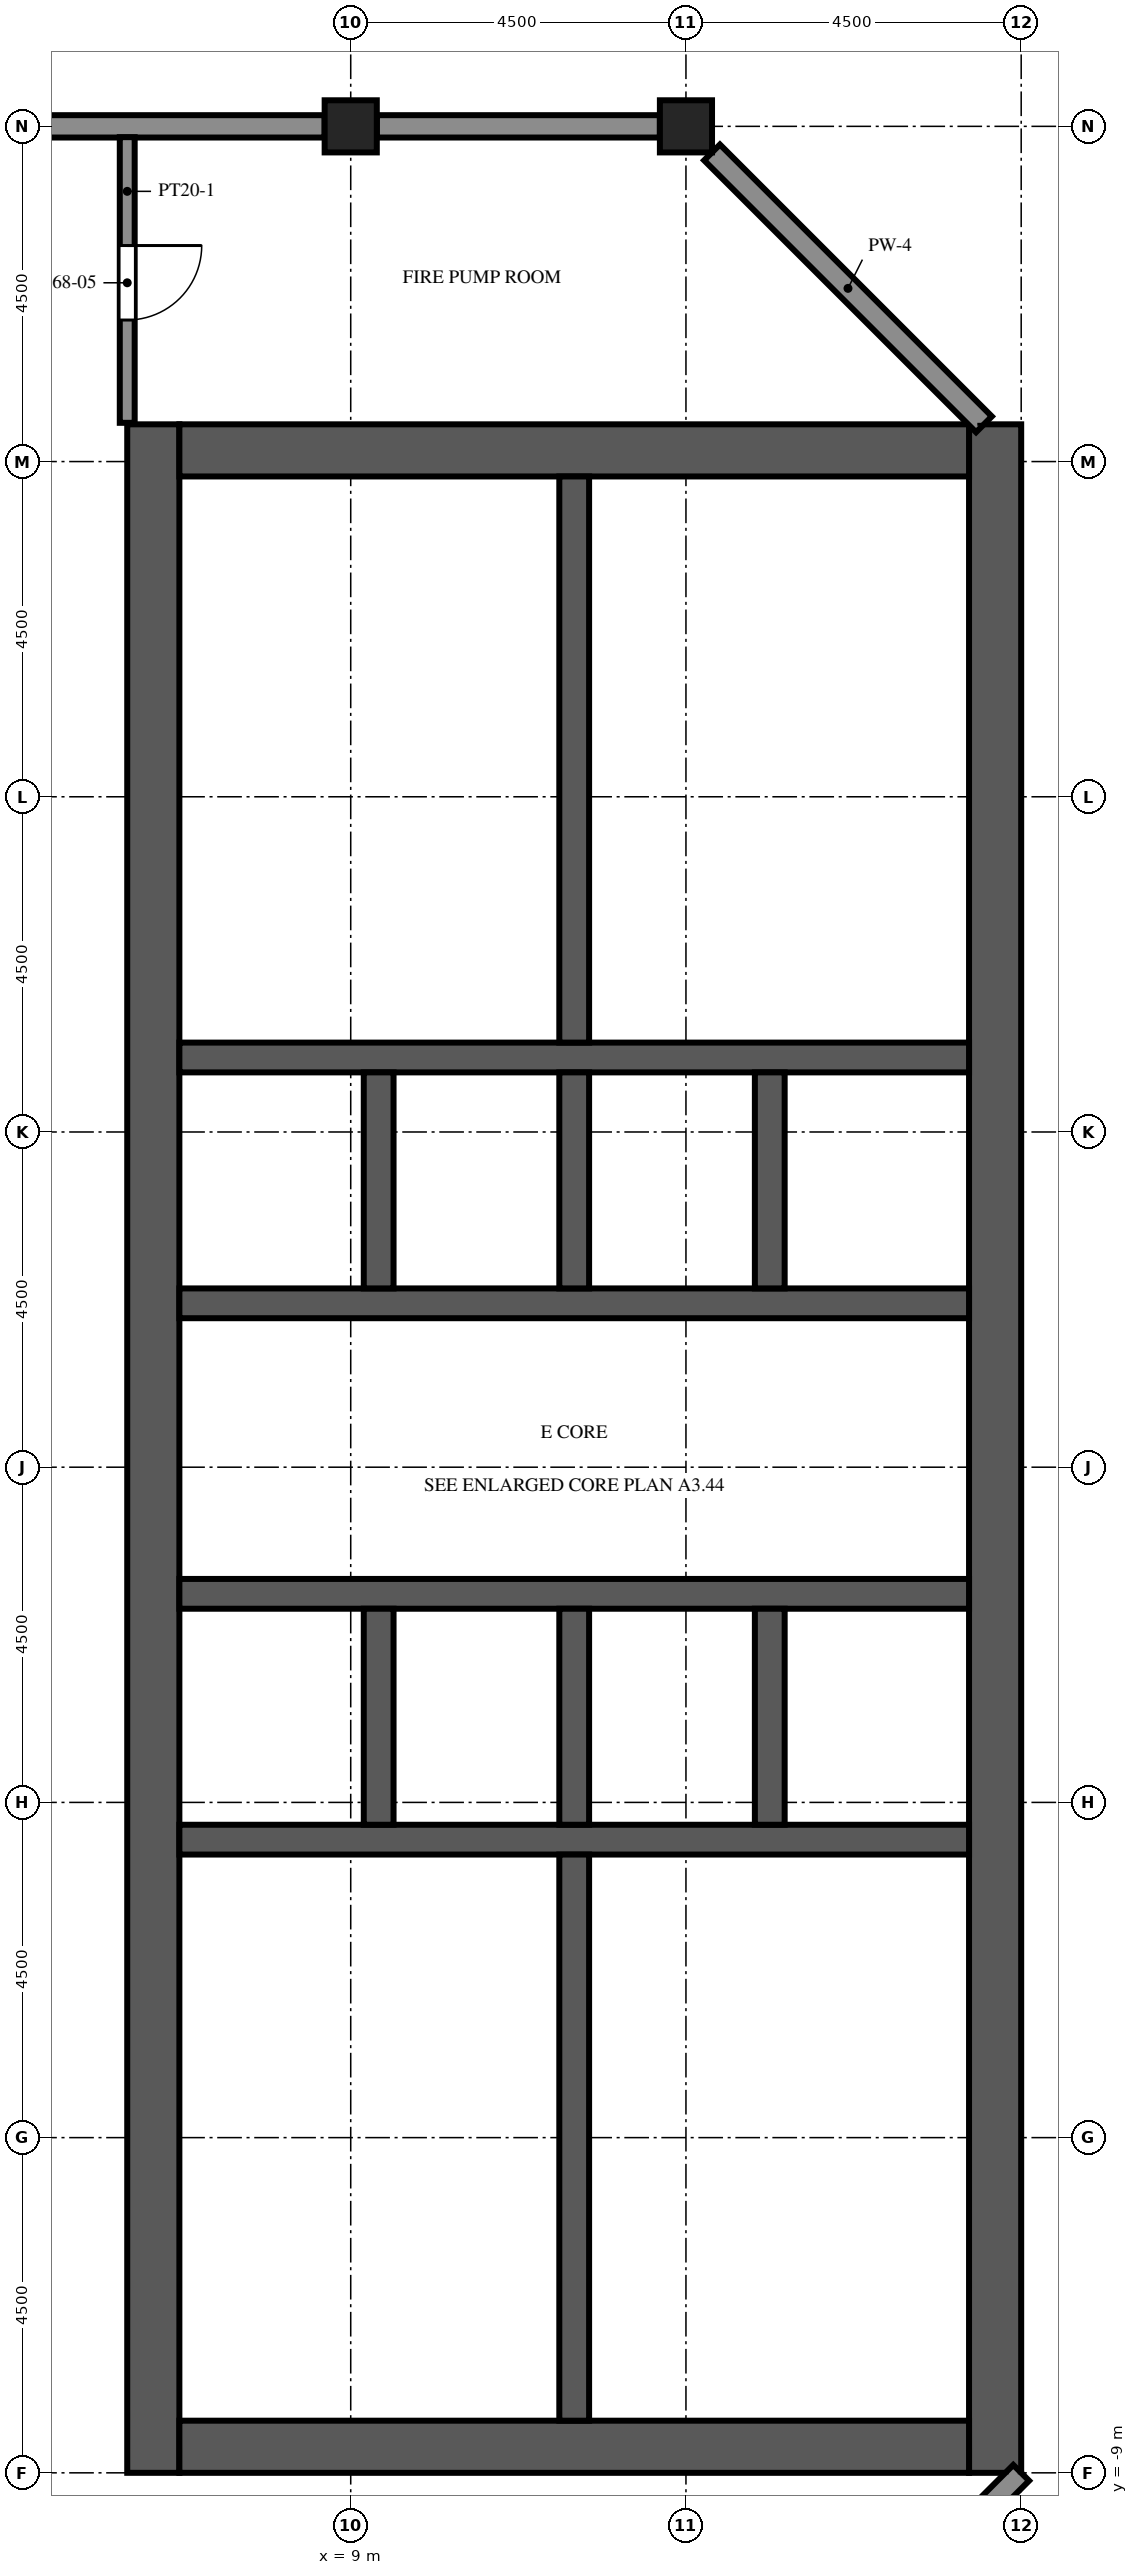
"""IFC4 building model, lengths in metres.
Left out: names, types, materials, properties, quantities, classifications, styles, units other than length and angle.
Written with IfcOpenShell. Run it as: python <this file> out.ifc"""

import sys

from ifc_helpers import new_model, si_unit, direction, frame, frame_2d, origin, origin_2d, place, context, subcontext, project, spatial, rectangle, extrude, element, fill, save


model = new_model("IFC4")
c1 = context("Model", 3, precision=1e-05, world=origin(), true_north=direction((0.0, 1.0)))
c2 = subcontext(c1, "Body", "Model", "MODEL_VIEW")
j1 = project(units=[si_unit("LENGTHUNIT", "METRE"), si_unit("PLANEANGLEUNIT", "RADIAN")], contexts=[c1])
p1 = place(None, origin())
s1 = spatial("IfcSite", under=j1, at=p1, CompositionType="ELEMENT")
p2 = place(p1, origin())
s2 = spatial("IfcBuilding", under=s1, at=p2, CompositionType="ELEMENT")
p3 = place(p2, frame((0.0, 0.0, 301.0)))
s3 = spatial("IfcBuildingStorey", under=s2, at=p3, CompositionType="ELEMENT", Elevation=301.0)
for number, where, z_axis, x_axis in (
    (1, (9.0, 22.5, -0.6), (0.0, 0.0, 1.0), (1.0, 0.0, 0.0)),
    (2, (13.5, 22.5, -0.6), (0.0, 0.0, 1.0), (1.0, 0.0, 0.0)),
):
    element("IfcColumn", number, at=place(p3, frame(where, z_axis=z_axis, x_axis=x_axis)), inside=s3, PredefinedType="COLUMN", context=c2, shape_type="SweptSolid", body=[
        extrude(rectangle(XDim=0.7, YDim=0.7, at=origin_2d()), origin(), (0.0, 0.0, 1.0), 6.0),
    ])
p4 = place(p3, frame((6.35, -9.0, 0.0), z_axis=(0.0, 0.0, 1.0), x_axis=(0.0, 1.0, 0.0)))
e3 = element("IfcWall", 3, at=p4, inside=s3, PredefinedType="SHEAR", context=c2, shape_type="SweptSolid", body=[
    extrude(rectangle(XDim=27.5, YDim=0.7, at=frame_2d((13.75, 0.0))), origin(), (0.0, 0.0, 1.0), 5.4),
])
p5 = place(p4, frame((12.55, 0.0, 0.0)))
e4 = element("IfcOpeningElement", 4, at=p5, cuts=e3, PredefinedType="OPENING", context=c2, shape_type="SweptSolid", body=[
    extrude(rectangle(XDim=2.4, YDim=2.4, at=frame_2d((1.2, 1.2))), frame((0.0, 0.36, 0.0), z_axis=(0.0, -1.0, 0.0), x_axis=(1.0, 0.0, 0.0)), (0.0, 0.0, 1.0), 0.72),
])
p6 = place(p4, frame((3.9, 0.0, 0.0)))
e5 = element("IfcOpeningElement", 5, at=p6, cuts=e3, PredefinedType="OPENING", context=c2, shape_type="SweptSolid", body=[
    extrude(rectangle(XDim=1.2, YDim=2.1, at=frame_2d((0.6, 1.05))), frame((0.0, 0.36, 0.0), z_axis=(0.0, -1.0, 0.0), x_axis=(1.0, 0.0, 0.0)), (0.0, 0.0, 1.0), 0.72),
])
p7 = place(p4, frame((22.4, 0.0, 0.0)))
e6 = element("IfcOpeningElement", 6, at=p7, cuts=e3, PredefinedType="OPENING", context=c2, shape_type="SweptSolid", body=[
    extrude(rectangle(XDim=1.2, YDim=2.1, at=frame_2d((0.6, 1.05))), frame((0.0, 0.36, 0.0), z_axis=(0.0, -1.0, 0.0), x_axis=(1.0, 0.0, 0.0)), (0.0, 0.0, 1.0), 0.72),
])
p8 = place(p3, frame((17.65, -9.0, 0.0), z_axis=(0.0, 0.0, 1.0), x_axis=(0.0, 1.0, 0.0)))
e7 = element("IfcWall", 7, at=p8, inside=s3, PredefinedType="SHEAR", context=c2, shape_type="SweptSolid", body=[
    extrude(rectangle(XDim=27.5, YDim=0.7, at=frame_2d((13.75, 0.0))), origin(), (0.0, 0.0, 1.0), 5.4),
])
for number, where, z_axis, x_axis in (
    (8, (6.7, -8.65, 0.0), (0.0, 0.0, 1.0), (1.0, 0.0, 0.0)),
    (9, (6.7, 18.15, 0.0), (0.0, 0.0, 1.0), (1.0, 0.0, 0.0)),
):
    element("IfcWall", number, at=place(p3, frame(where, z_axis=z_axis, x_axis=x_axis)), inside=s3, PredefinedType="SHEAR", context=c2, shape_type="SweptSolid", body=[
        extrude(rectangle(XDim=10.6, YDim=0.7, at=frame_2d((5.3, 0.0))), origin(), (0.0, 0.0, 1.0), 5.4),
    ])
p9 = place(p3, frame((6.7, -0.5, 0.0), z_axis=(0.0, 0.0, 1.0), x_axis=(1.0, 0.0, 0.0)))
e10 = element("IfcWall", 10, at=p9, inside=s3, PredefinedType="SHEAR", context=c2, shape_type="SweptSolid", body=[
    extrude(rectangle(XDim=10.6, YDim=0.4, at=frame_2d((5.3, 0.0))), origin(), (0.0, 0.0, 1.0), 5.4),
])
p10 = place(p3, frame((6.7, 2.8, 0.0), z_axis=(0.0, 0.0, 1.0), x_axis=(1.0, 0.0, 0.0)))
e11 = element("IfcWall", 11, at=p10, inside=s3, PredefinedType="SHEAR", context=c2, shape_type="SweptSolid", body=[
    extrude(rectangle(XDim=10.6, YDim=0.4, at=frame_2d((5.3, 0.0))), origin(), (0.0, 0.0, 1.0), 5.4),
])
p11 = place(p10, frame((0.688, 0.0, 0.0)))
e12 = element("IfcOpeningElement", 12, at=p11, cuts=e11, PredefinedType="OPENING", context=c2, shape_type="SweptSolid", body=[
    extrude(rectangle(XDim=1.1, YDim=2.1, at=frame_2d((0.55, 1.05))), frame((0.0, 0.21, 0.0), z_axis=(0.0, -1.0, 0.0), x_axis=(1.0, 0.0, 0.0)), (0.0, 0.0, 1.0), 0.42),
])
p12 = place(p10, frame((3.438, 0.0, 0.0)))
e13 = element("IfcOpeningElement", 13, at=p12, cuts=e11, PredefinedType="OPENING", context=c2, shape_type="SweptSolid", body=[
    extrude(rectangle(XDim=1.1, YDim=2.1, at=frame_2d((0.55, 1.05))), frame((0.0, 0.21, 0.0), z_axis=(0.0, -1.0, 0.0), x_axis=(1.0, 0.0, 0.0)), (0.0, 0.0, 1.0), 0.42),
])
p13 = place(p10, frame((6.113, 0.0, 0.0)))
e14 = element("IfcOpeningElement", 14, at=p13, cuts=e11, PredefinedType="OPENING", context=c2, shape_type="SweptSolid", body=[
    extrude(rectangle(XDim=1.0, YDim=2.1, at=frame_2d((0.5, 1.05))), frame((0.0, 0.21, 0.0), z_axis=(0.0, -1.0, 0.0), x_axis=(1.0, 0.0, 0.0)), (0.0, 0.0, 1.0), 0.42),
])
p14 = place(p10, frame((8.863, 0.0, 0.0)))
e15 = element("IfcOpeningElement", 15, at=p14, cuts=e11, PredefinedType="OPENING", context=c2, shape_type="SweptSolid", body=[
    extrude(rectangle(XDim=1.0, YDim=2.1, at=frame_2d((0.5, 1.05))), frame((0.0, 0.21, 0.0), z_axis=(0.0, -1.0, 0.0), x_axis=(1.0, 0.0, 0.0)), (0.0, 0.0, 1.0), 0.42),
])
p15 = place(p3, frame((6.7, 6.7, 0.0), z_axis=(0.0, 0.0, 1.0), x_axis=(1.0, 0.0, 0.0)))
e16 = element("IfcWall", 16, at=p15, inside=s3, PredefinedType="SHEAR", context=c2, shape_type="SweptSolid", body=[
    extrude(rectangle(XDim=10.6, YDim=0.4, at=frame_2d((5.3, 0.0))), origin(), (0.0, 0.0, 1.0), 5.4),
])
p16 = place(p15, frame((0.738, 0.0, 0.0)))
e17 = element("IfcOpeningElement", 17, at=p16, cuts=e16, PredefinedType="OPENING", context=c2, shape_type="SweptSolid", body=[
    extrude(rectangle(XDim=1.0, YDim=2.1, at=frame_2d((0.5, 1.05))), frame((0.0, 0.21, 0.0), z_axis=(0.0, -1.0, 0.0), x_axis=(1.0, 0.0, 0.0)), (0.0, 0.0, 1.0), 0.42),
])
p17 = place(p15, frame((3.488, 0.0, 0.0)))
e18 = element("IfcOpeningElement", 18, at=p17, cuts=e16, PredefinedType="OPENING", context=c2, shape_type="SweptSolid", body=[
    extrude(rectangle(XDim=1.0, YDim=2.1, at=frame_2d((0.5, 1.05))), frame((0.0, 0.21, 0.0), z_axis=(0.0, -1.0, 0.0), x_axis=(1.0, 0.0, 0.0)), (0.0, 0.0, 1.0), 0.42),
])
p18 = place(p15, frame((6.113, 0.0, 0.0)))
e19 = element("IfcOpeningElement", 19, at=p18, cuts=e16, PredefinedType="OPENING", context=c2, shape_type="SweptSolid", body=[
    extrude(rectangle(XDim=1.0, YDim=2.1, at=frame_2d((0.5, 1.05))), frame((0.0, 0.21, 0.0), z_axis=(0.0, -1.0, 0.0), x_axis=(1.0, 0.0, 0.0)), (0.0, 0.0, 1.0), 0.42),
])
p19 = place(p15, frame((8.863, 0.0, 0.0)))
e20 = element("IfcOpeningElement", 20, at=p19, cuts=e16, PredefinedType="OPENING", context=c2, shape_type="SweptSolid", body=[
    extrude(rectangle(XDim=1.0, YDim=2.1, at=frame_2d((0.5, 1.05))), frame((0.0, 0.21, 0.0), z_axis=(0.0, -1.0, 0.0), x_axis=(1.0, 0.0, 0.0)), (0.0, 0.0, 1.0), 0.42),
])
p20 = place(p3, frame((6.7, 10.0, 0.0), z_axis=(0.0, 0.0, 1.0), x_axis=(1.0, 0.0, 0.0)))
e21 = element("IfcWall", 21, at=p20, inside=s3, PredefinedType="SHEAR", context=c2, shape_type="SweptSolid", body=[
    extrude(rectangle(XDim=10.6, YDim=0.4, at=frame_2d((5.3, 0.0))), origin(), (0.0, 0.0, 1.0), 5.4),
])
for number, where, z_axis, x_axis in (
    (22, (9.375, -0.3, 0.0), (0.0, 0.0, 1.0), (0.0, 1.0, 0.0)),
    (23, (9.375, 6.9, 0.0), (0.0, 0.0, 1.0), (0.0, 1.0, 0.0)),
    (24, (12.0, -0.3, 0.0), (0.0, 0.0, 1.0), (0.0, 1.0, 0.0)),
    (25, (12.0, 6.9, 0.0), (0.0, 0.0, 1.0), (0.0, 1.0, 0.0)),
    (26, (14.625, -0.3, 0.0), (0.0, 0.0, 1.0), (0.0, 1.0, 0.0)),
    (27, (14.625, 6.9, 0.0), (0.0, 0.0, 1.0), (0.0, 1.0, 0.0)),
):
    element("IfcWall", number, at=place(p3, frame(where, z_axis=z_axis, x_axis=x_axis)), inside=s3, PredefinedType="SHEAR", context=c2, shape_type="SweptSolid", body=[
        extrude(rectangle(XDim=2.9, YDim=0.4, at=frame_2d((1.45, 0.0))), origin(), (0.0, 0.0, 1.0), 5.4),
    ])
p21 = place(p3, frame((12.0, -8.3, 0.0), z_axis=(0.0, 0.0, 1.0), x_axis=(0.0, 1.0, 0.0)))
e28 = element("IfcWall", 28, at=p21, inside=s3, PredefinedType="SHEAR", context=c2, shape_type="SweptSolid", body=[
    extrude(rectangle(XDim=7.6, YDim=0.4, at=frame_2d((3.8, 0.0))), origin(), (0.0, 0.0, 1.0), 5.4),
])
p22 = place(p21, frame((6.125, 0.0, 0.0)))
e29 = element("IfcOpeningElement", 29, at=p22, cuts=e28, PredefinedType="OPENING", context=c2, shape_type="SweptSolid", body=[
    extrude(rectangle(XDim=1.2, YDim=2.1, at=frame_2d((0.6, 1.05))), frame((0.0, 0.21, 0.0), z_axis=(0.0, -1.0, 0.0), x_axis=(1.0, 0.0, 0.0)), (0.0, 0.0, 1.0), 0.42),
])
p23 = place(p3, frame((12.0, 10.2, 0.0), z_axis=(0.0, 0.0, 1.0), x_axis=(0.0, 1.0, 0.0)))
e30 = element("IfcWall", 30, at=p23, inside=s3, PredefinedType="SHEAR", context=c2, shape_type="SweptSolid", body=[
    extrude(rectangle(XDim=7.6, YDim=0.4, at=frame_2d((3.8, 0.0))), origin(), (0.0, 0.0, 1.0), 5.4),
])
p24 = place(p23, frame((0.275, 0.0, 0.0)))
e31 = element("IfcOpeningElement", 31, at=p24, cuts=e30, PredefinedType="OPENING", context=c2, shape_type="SweptSolid", body=[
    extrude(rectangle(XDim=1.2, YDim=2.1, at=frame_2d((0.6, 1.05))), frame((0.0, 0.21, 0.0), z_axis=(0.0, -1.0, 0.0), x_axis=(1.0, 0.0, 0.0)), (0.0, 0.0, 1.0), 0.42),
])
p25 = place(p3, frame((13.85, -13.15, 0.0), z_axis=(0.0, 0.0, 1.0), x_axis=(0.707106781187, 0.707106781187, 0.0)))
e32 = element("IfcWall", 32, at=p25, inside=s3, PredefinedType="SOLIDWALL", context=c2, shape_type="SweptSolid", body=[
    extrude(rectangle(XDim=5.869, YDim=0.3, at=frame_2d((2.935, 0.0))), origin(), (0.0, 0.0, 1.0), 4.1),
])
p26 = place(p3, frame((17.5, 18.5, 0.0), z_axis=(0.0, 0.0, 1.0), x_axis=(-0.707106781187, 0.707106781187, 0.0)))
e33 = element("IfcWall", 33, at=p26, inside=s3, PredefinedType="SOLIDWALL", context=c2, shape_type="SweptSolid", body=[
    extrude(rectangle(XDim=5.162, YDim=0.3, at=frame_2d((2.581, 0.0))), origin(), (0.0, 0.0, 1.0), 4.1),
])
for number, where, z_axis, x_axis in (
    (34, (13.15, 22.5, 0.0), (0.0, 0.0, 1.0), (-1.0, 0.0, 0.0)),
    (35, (8.65, 22.5, 0.0), (0.0, 0.0, 1.0), (-1.0, 0.0, 0.0)),
):
    element("IfcWall", number, at=place(p3, frame(where, z_axis=z_axis, x_axis=x_axis)), inside=s3, PredefinedType="SOLIDWALL", context=c2, shape_type="SweptSolid", body=[
        extrude(rectangle(XDim=3.8, YDim=0.3, at=frame_2d((1.9, 0.0))), origin(), (0.0, 0.0, 1.0), 0.85),
    ])
p27 = place(p3, frame((17.917, 26.8, 0.0), z_axis=(0.0, 0.0, 1.0), x_axis=(0.707106781187, -0.707106781187, 0.0)))
e36 = element("IfcWall", 36, at=p27, inside=s3, PredefinedType="PARAPET", context=c2, shape_type="SweptSolid", body=[
    extrude(rectangle(XDim=6.198, YDim=0.2, at=frame_2d((3.099, 0.0))), origin(), (0.0, 0.0, 1.0), 1.1),
])
p28 = place(p3, frame((6.0, 22.355, 0.0), z_axis=(0.0, 0.0, 1.0), x_axis=(0.0, -1.0, 0.0)))
e37 = element("IfcWall", 37, at=p28, inside=s3, PredefinedType="PARTITIONING", context=c2, shape_type="SweptSolid", body=[
    extrude(rectangle(XDim=3.835, YDim=0.2, at=frame_2d((1.917, 0.0))), origin(), (0.0, 0.0, 1.0), 4.8),
])
p29 = place(p28, frame((1.455, 0.0, 0.0)))
e38 = element("IfcOpeningElement", 38, at=p29, cuts=e37, PredefinedType="OPENING", context=c2, shape_type="SweptSolid", body=[
    extrude(rectangle(XDim=1.0, YDim=2.1, at=frame_2d((0.5, 1.05))), frame((0.0, 0.11, 0.0), z_axis=(0.0, -1.0, 0.0), x_axis=(1.0, 0.0, 0.0)), (0.0, 0.0, 1.0), 0.22),
])
p30 = place(p29, origin())
e39 = element("IfcDoor", 39, at=p30, inside=s3, OperationType="SINGLE_SWING_LEFT", PredefinedType="DOOR", context=c2, shape_type="SweptSolid", body=[
    extrude(rectangle(XDim=1.0, YDim=2.1, at=frame_2d((0.5, 1.05))), frame((0.0, 0.025, 0.0), z_axis=(0.0, -1.0, 0.0), x_axis=(1.0, 0.0, 0.0)), (0.0, 0.0, 1.0), 0.05),
])
fill(e38, e39)
p31 = place(p11, origin())
e40 = element("IfcDoor", 40, at=p31, inside=s3, OperationType="DOUBLE_DOOR_SLIDING", PredefinedType="DOOR", context=c2, shape_type="SweptSolid", body=[
    extrude(rectangle(XDim=1.1, YDim=2.1, at=frame_2d((0.55, 1.05))), frame((0.0, 0.025, 0.0), z_axis=(0.0, -1.0, 0.0), x_axis=(1.0, 0.0, 0.0)), (0.0, 0.0, 1.0), 0.05),
])
fill(e12, e40)
p32 = place(p12, origin())
e41 = element("IfcDoor", 41, at=p32, inside=s3, OperationType="DOUBLE_DOOR_SLIDING", PredefinedType="DOOR", context=c2, shape_type="SweptSolid", body=[
    extrude(rectangle(XDim=1.1, YDim=2.1, at=frame_2d((0.55, 1.05))), frame((0.0, 0.025, 0.0), z_axis=(0.0, -1.0, 0.0), x_axis=(1.0, 0.0, 0.0)), (0.0, 0.0, 1.0), 0.05),
])
fill(e13, e41)
p33 = place(p5, origin())
e42 = element("IfcDoor", 42, at=p33, inside=s3, OperationType="DOUBLE_DOOR_DOUBLE_SWING", PredefinedType="DOOR", context=c2, shape_type="SweptSolid", body=[
    extrude(rectangle(XDim=2.4, YDim=2.4, at=frame_2d((1.2, 1.2))), frame((0.0, 0.025, 0.0), z_axis=(0.0, -1.0, 0.0), x_axis=(1.0, 0.0, 0.0)), (0.0, 0.0, 1.0), 0.05),
])
fill(e4, e42)
p34 = place(p22, origin())
e43 = element("IfcDoor", 43, at=p34, inside=s3, OperationType="SINGLE_SWING_RIGHT", PredefinedType="DOOR", context=c2, shape_type="SweptSolid", body=[
    extrude(rectangle(XDim=1.2, YDim=2.1, at=frame_2d((0.6, 1.05))), frame((0.0, 0.025, 0.0), z_axis=(0.0, -1.0, 0.0), x_axis=(1.0, 0.0, 0.0)), (0.0, 0.0, 1.0), 0.05),
])
fill(e29, e43)
p35 = place(p24, origin())
e44 = element("IfcDoor", 44, at=p35, inside=s3, OperationType="SINGLE_SWING_RIGHT", PredefinedType="DOOR", context=c2, shape_type="SweptSolid", body=[
    extrude(rectangle(XDim=1.2, YDim=2.1, at=frame_2d((0.6, 1.05))), frame((0.0, 0.025, 0.0), z_axis=(0.0, -1.0, 0.0), x_axis=(1.0, 0.0, 0.0)), (0.0, 0.0, 1.0), 0.05),
])
fill(e31, e44)
p36 = place(p13, origin())
e45 = element("IfcDoor", 45, at=p36, inside=s3, OperationType="SINGLE_SWING_LEFT", PredefinedType="DOOR", context=c2, shape_type="SweptSolid", body=[
    extrude(rectangle(XDim=1.0, YDim=2.1, at=frame_2d((0.5, 1.05))), frame((0.0, 0.025, 0.0), z_axis=(0.0, -1.0, 0.0), x_axis=(1.0, 0.0, 0.0)), (0.0, 0.0, 1.0), 0.05),
])
fill(e14, e45)
p37 = place(p14, origin())
e46 = element("IfcDoor", 46, at=p37, inside=s3, OperationType="SINGLE_SWING_RIGHT", PredefinedType="DOOR", context=c2, shape_type="SweptSolid", body=[
    extrude(rectangle(XDim=1.0, YDim=2.1, at=frame_2d((0.5, 1.05))), frame((0.0, 0.025, 0.0), z_axis=(0.0, -1.0, 0.0), x_axis=(1.0, 0.0, 0.0)), (0.0, 0.0, 1.0), 0.05),
])
fill(e15, e46)
p38 = place(p16, origin())
e47 = element("IfcDoor", 47, at=p38, inside=s3, OperationType="SINGLE_SWING_LEFT", PredefinedType="DOOR", context=c2, shape_type="SweptSolid", body=[
    extrude(rectangle(XDim=1.0, YDim=2.1, at=frame_2d((0.5, 1.05))), frame((0.0, 0.025, 0.0), z_axis=(0.0, -1.0, 0.0), x_axis=(1.0, 0.0, 0.0)), (0.0, 0.0, 1.0), 0.05),
])
fill(e17, e47)
p39 = place(p17, origin())
e48 = element("IfcDoor", 48, at=p39, inside=s3, OperationType="SINGLE_SWING_RIGHT", PredefinedType="DOOR", context=c2, shape_type="SweptSolid", body=[
    extrude(rectangle(XDim=1.0, YDim=2.1, at=frame_2d((0.5, 1.05))), frame((0.0, 0.025, 0.0), z_axis=(0.0, -1.0, 0.0), x_axis=(1.0, 0.0, 0.0)), (0.0, 0.0, 1.0), 0.05),
])
fill(e18, e48)
p40 = place(p18, origin())
e49 = element("IfcDoor", 49, at=p40, inside=s3, OperationType="SINGLE_SWING_LEFT", PredefinedType="DOOR", context=c2, shape_type="SweptSolid", body=[
    extrude(rectangle(XDim=1.0, YDim=2.1, at=frame_2d((0.5, 1.05))), frame((0.0, 0.025, 0.0), z_axis=(0.0, -1.0, 0.0), x_axis=(1.0, 0.0, 0.0)), (0.0, 0.0, 1.0), 0.05),
])
fill(e19, e49)
p41 = place(p19, origin())
e50 = element("IfcDoor", 50, at=p41, inside=s3, OperationType="SINGLE_SWING_RIGHT", PredefinedType="DOOR", context=c2, shape_type="SweptSolid", body=[
    extrude(rectangle(XDim=1.0, YDim=2.1, at=frame_2d((0.5, 1.05))), frame((0.0, 0.025, 0.0), z_axis=(0.0, -1.0, 0.0), x_axis=(1.0, 0.0, 0.0)), (0.0, 0.0, 1.0), 0.05),
])
fill(e20, e50)
p42 = place(p6, origin())
e51 = element("IfcDoor", 51, at=p42, inside=s3, OperationType="SINGLE_SWING_RIGHT", PredefinedType="DOOR", context=c2, shape_type="SweptSolid", body=[
    extrude(rectangle(XDim=1.2, YDim=2.1, at=frame_2d((0.6, 1.05))), frame((0.0, -0.275, 0.0), z_axis=(0.0, -1.0, 0.0), x_axis=(1.0, 0.0, 0.0)), (0.0, 0.0, 1.0), 0.05),
])
fill(e5, e51)
p43 = place(p7, origin())
e52 = element("IfcDoor", 52, at=p43, inside=s3, OperationType="SINGLE_SWING_RIGHT", PredefinedType="DOOR", context=c2, shape_type="SweptSolid", body=[
    extrude(rectangle(XDim=1.2, YDim=2.1, at=frame_2d((0.6, 1.05))), frame((0.0, -0.275, 0.0), z_axis=(0.0, -1.0, 0.0), x_axis=(1.0, 0.0, 0.0)), (0.0, 0.0, 1.0), 0.05),
])
fill(e6, e52)
save(model, sys.argv[1])
